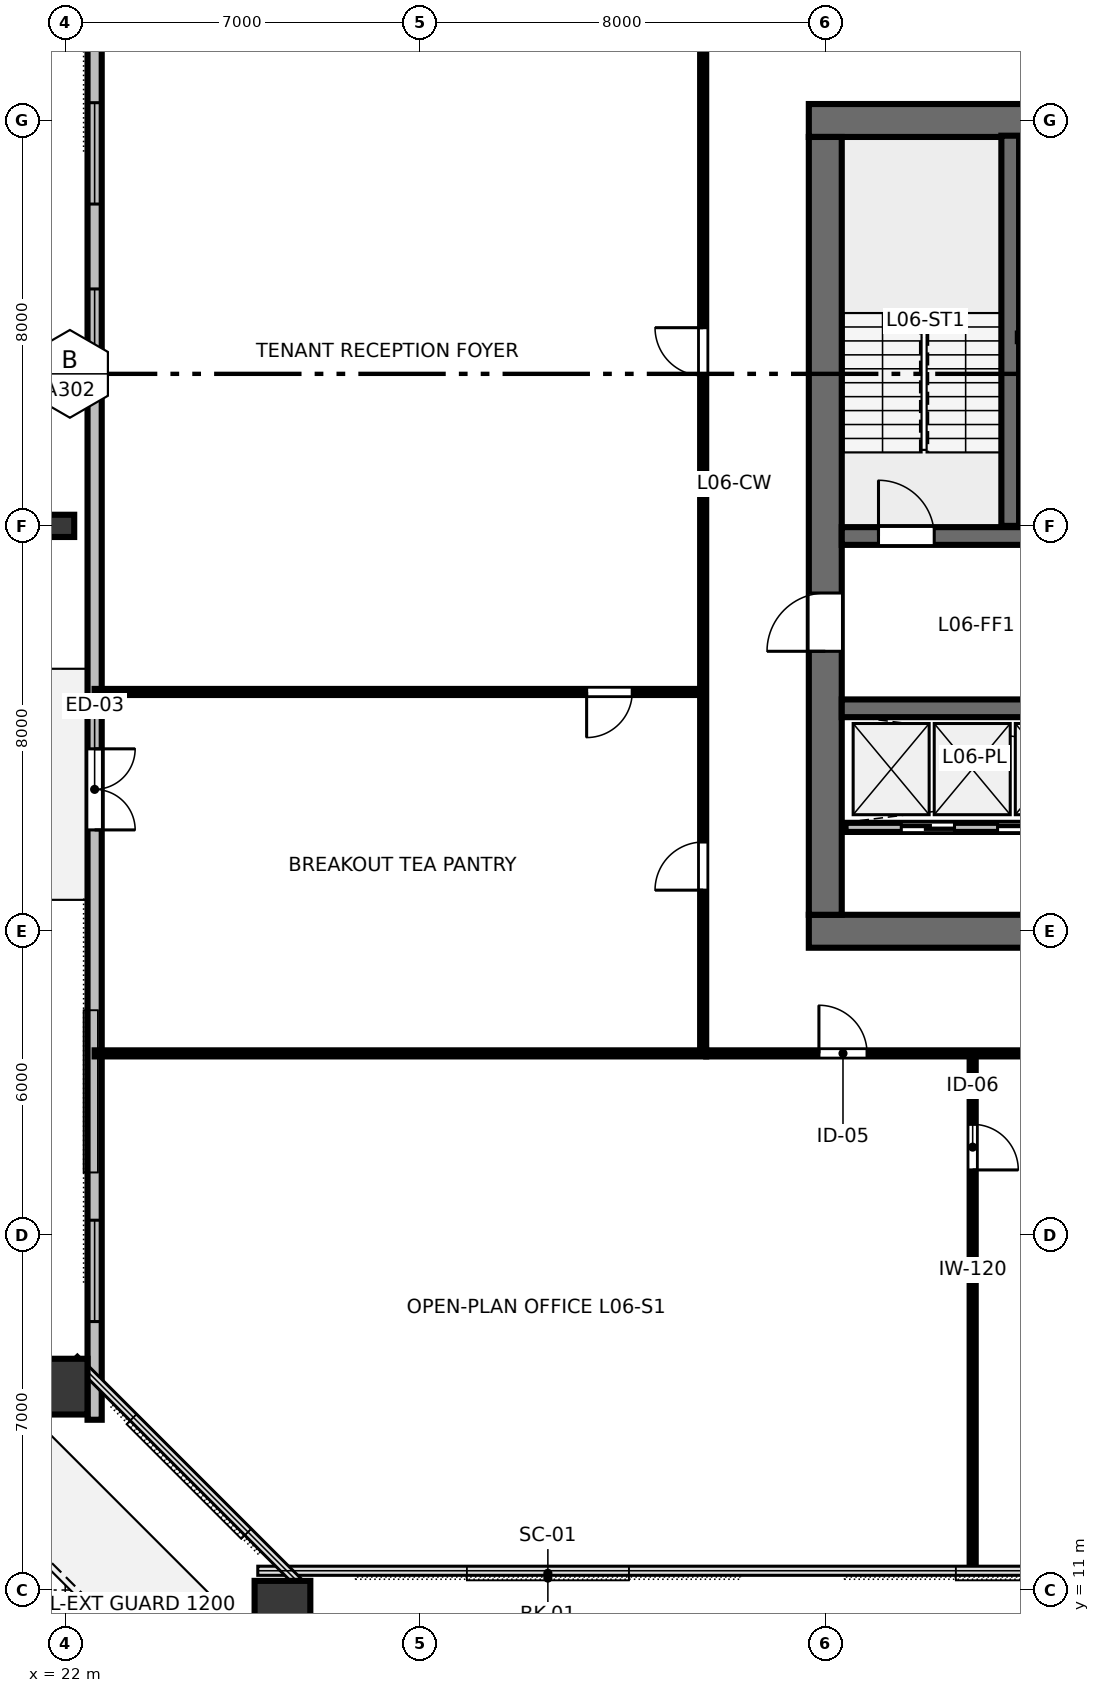
"""IFC4 building model, lengths in metres.
Left out: names, types, materials, properties, quantities, classifications, styles, units other than length and angle.
Written with IfcOpenShell. Run it as: python <this file> out.ifc"""

import sys

from ifc_helpers import new_model, si_unit, direction, frame, frame_2d, origin, origin_2d, place, context, subcontext, project, spatial, rectangle, hollow_rectangle, i_section, extrude, element, fill, save


model = new_model("IFC4")
c1 = context("Model", 3, precision=1e-05, world=origin(), true_north=direction((0.0, 1.0)))
c2 = subcontext(c1, "Body", "Model", "MODEL_VIEW")
j1 = project(units=[si_unit("LENGTHUNIT", "METRE"), si_unit("PLANEANGLEUNIT", "RADIAN")], contexts=[c1])
p1 = place(None, origin())
s1 = spatial("IfcSite", under=j1, at=p1, CompositionType="ELEMENT")
p2 = place(p1, origin())
s2 = spatial("IfcBuilding", under=s1, at=p2, CompositionType="ELEMENT")
p3 = place(p2, frame((0.0, 0.0, 28.0)))
s3 = spatial("IfcBuildingStorey", under=s2, at=p3, CompositionType="ELEMENT", Elevation=28.0)
p4 = place(p3, frame((36.675, 24.0, 0.0), z_axis=(0.0, 0.0, 1.0), x_axis=(1.0, 0.0, 0.0)))
e1 = element("IfcWall", 1, at=p4, inside=s3, PredefinedType="SHEAR", context=c2, shape_type="SweptSolid", body=[
    extrude(rectangle(XDim=18.65, YDim=0.65, at=frame_2d((9.325, 0.0))), origin(), (0.0, 0.0, 1.0), 3.36),
])
p5 = place(p4, frame((5.725, 0.0, 0.0)))
e2 = element("IfcOpeningElement", 2, at=p5, cuts=e1, PredefinedType="OPENING", context=c2, shape_type="SweptSolid", body=[
    extrude(rectangle(XDim=1.6, YDim=2.15, at=frame_2d((0.8, 1.075))), frame((0.0, 0.335, 0.0), z_axis=(0.0, -1.0, 0.0), x_axis=(1.0, 0.0, 0.0)), (0.0, 0.0, 1.0), 0.67),
])
p6 = place(p4, frame((12.125, 0.0, 0.0)))
e3 = element("IfcOpeningElement", 3, at=p6, cuts=e1, PredefinedType="OPENING", context=c2, shape_type="SweptSolid", body=[
    extrude(rectangle(XDim=1.6, YDim=2.15, at=frame_2d((0.8, 1.075))), frame((0.0, 0.335, 0.0), z_axis=(0.0, -1.0, 0.0), x_axis=(1.0, 0.0, 0.0)), (0.0, 0.0, 1.0), 0.67),
])
p7 = place(p3, frame((36.675, 40.0, 0.0), z_axis=(0.0, 0.0, 1.0), x_axis=(1.0, 0.0, 0.0)))
e4 = element("IfcWall", 4, at=p7, inside=s3, PredefinedType="SHEAR", context=c2, shape_type="SweptSolid", body=[
    extrude(rectangle(XDim=18.65, YDim=0.65, at=frame_2d((9.325, 0.0))), origin(), (0.0, 0.0, 1.0), 3.36),
])
p8 = place(p7, frame((8.825, 0.0, 0.0)))
e5 = element("IfcOpeningElement", 5, at=p8, cuts=e4, PredefinedType="OPENING", context=c2, shape_type="SweptSolid", body=[
    extrude(rectangle(XDim=1.0, YDim=2.15, at=frame_2d((0.5, 1.075))), frame((0.0, 0.335, 0.0), z_axis=(0.0, -1.0, 0.0), x_axis=(1.0, 0.0, 0.0)), (0.0, 0.0, 1.0), 0.67),
])
p9 = place(p3, frame((37.0, 24.325, 0.0), z_axis=(0.0, 0.0, 1.0), x_axis=(0.0, 1.0, 0.0)))
e6 = element("IfcWall", 6, at=p9, inside=s3, PredefinedType="SHEAR", context=c2, shape_type="SweptSolid", body=[
    extrude(rectangle(XDim=15.35, YDim=0.65, at=frame_2d((7.675, 0.0))), origin(), (0.0, 0.0, 1.0), 3.36),
])
p10 = place(p9, frame((5.2, 0.0, 0.0)))
e7 = element("IfcOpeningElement", 7, at=p10, cuts=e6, PredefinedType="OPENING", context=c2, shape_type="SweptSolid", body=[
    extrude(rectangle(XDim=1.15, YDim=2.15, at=frame_2d((0.575, 1.075))), frame((0.0, 0.335, 0.0), z_axis=(0.0, -1.0, 0.0), x_axis=(1.0, 0.0, 0.0)), (0.0, 0.0, 1.0), 0.67),
])
p11 = place(p3, frame((37.325, 31.8, 0.0), z_axis=(0.0, 0.0, 1.0), x_axis=(1.0, 0.0, 0.0)))
e8 = element("IfcWall", 8, at=p11, inside=s3, PredefinedType="SHEAR", context=c2, shape_type="SweptSolid", body=[
    extrude(rectangle(XDim=17.35, YDim=0.35, at=frame_2d((8.675, 0.0))), origin(), (0.0, 0.0, 1.0), 3.36),
])
p12 = place(p11, frame((0.725, 0.0, 0.0)))
e9 = element("IfcOpeningElement", 9, at=p12, cuts=e8, PredefinedType="OPENING", context=c2, shape_type="SweptSolid", body=[
    extrude(rectangle(XDim=1.1, YDim=2.15, at=frame_2d((0.55, 1.075))), frame((0.0, 0.185, 0.0), z_axis=(0.0, -1.0, 0.0), x_axis=(1.0, 0.0, 0.0)), (0.0, 0.0, 1.0), 0.37),
])
p13 = place(p11, frame((14.625, 0.0, 0.0)))
e10 = element("IfcOpeningElement", 10, at=p13, cuts=e8, PredefinedType="OPENING", context=c2, shape_type="SweptSolid", body=[
    extrude(rectangle(XDim=1.1, YDim=2.15, at=frame_2d((0.55, 1.075))), frame((0.0, 0.185, 0.0), z_axis=(0.0, -1.0, 0.0), x_axis=(1.0, 0.0, 0.0)), (0.0, 0.0, 1.0), 0.37),
])
p14 = place(p3, frame((37.325, 28.4, 0.0), z_axis=(0.0, 0.0, 1.0), x_axis=(1.0, 0.0, 0.0)))
e11 = element("IfcWall", 11, at=p14, inside=s3, PredefinedType="SHEAR", context=c2, shape_type="SweptSolid", body=[
    extrude(rectangle(XDim=17.35, YDim=0.35, at=frame_2d((8.675, 0.0))), origin(), (0.0, 0.0, 1.0), 3.36),
])
p15 = place(p3, frame((26.287, 10.531, 0.0), z_axis=(0.0, 0.0, 1.0), x_axis=(1.0, 0.0, 0.0)))
e12 = element("IfcColumn", 12, at=p15, inside=s3, PredefinedType="COLUMN", context=c2, shape_type="SweptSolid", body=[
    extrude(hollow_rectangle(XDim=1.1, YDim=1.3, WallThickness=0.07, at=origin_2d()), origin(), (0.0, 0.0, 1.0), 3.358),
])
p16 = place(p3, frame((21.92, 32.0, 0.0), z_axis=(0.0, 0.0, 1.0), x_axis=(0.0, 1.0, 0.0)))
e13 = element("IfcColumn", 13, at=p16, inside=s3, PredefinedType="COLUMN", context=c2, shape_type="SweptSolid", body=[
    extrude(i_section(OverallWidth=0.439, OverallDepth=0.514, WebThickness=0.06, FlangeThickness=0.097, FilletRadius=0.025, at=origin_2d()), origin(), (0.0, 0.0, 1.0), 3.358),
])
p17 = place(p3, frame((21.789, 15.013, 0.0), z_axis=(0.0, 0.0, 1.0), x_axis=(0.0, 1.0, 0.0)))
e14 = element("IfcColumn", 14, at=p17, inside=s3, PredefinedType="COLUMN", context=c2, shape_type="SweptSolid", body=[
    extrude(hollow_rectangle(XDim=1.1, YDim=1.3, WallThickness=0.07, at=origin_2d()), origin(), (0.0, 0.0, 1.0), 3.358),
])
p18 = place(p3, frame((22.58, 49.64, 0.0), z_axis=(0.0, 0.0, 1.0), x_axis=(0.0, -1.0, 0.0)))
e15 = element("IfcWall", 15, at=p18, inside=s3, PredefinedType="STANDARD", context=c2, shape_type="SweptSolid", body=[
    extrude(rectangle(XDim=35.28, YDim=0.28, at=frame_2d((17.64, 0.0))), origin(), (0.0, 0.0, 1.0), 3.36),
])
p19 = place(p18, frame((22.04, 0.0, 0.0)))
e16 = element("IfcOpeningElement", 16, at=p19, cuts=e15, PredefinedType="OPENING", context=c2, shape_type="SweptSolid", body=[
    extrude(rectangle(XDim=1.6, YDim=2.15, at=frame_2d((0.8, 1.075))), frame((0.0, 0.15, 0.0), z_axis=(0.0, -1.0, 0.0), x_axis=(1.0, 0.0, 0.0)), (0.0, 0.0, 1.0), 0.3),
])
p20 = place(p18, frame((1.938, 0.0, 0.8)))
e17 = element("IfcOpeningElement", 17, at=p20, cuts=e15, PredefinedType="OPENING", context=c2, shape_type="SweptSolid", body=[
    extrude(rectangle(XDim=2.0, YDim=1.95, at=frame_2d((1.0, 0.975))), frame((0.0, 0.15, 0.0), z_axis=(0.0, -1.0, 0.0), x_axis=(1.0, 0.0, 0.0)), (0.0, 0.0, 1.0), 0.3),
])
p21 = place(p18, frame((9.289, 0.0, 0.8)))
e18 = element("IfcOpeningElement", 18, at=p21, cuts=e15, PredefinedType="OPENING", context=c2, shape_type="SweptSolid", body=[
    extrude(rectangle(XDim=2.0, YDim=1.95, at=frame_2d((1.0, 0.975))), frame((0.0, 0.15, 0.0), z_axis=(0.0, -1.0, 0.0), x_axis=(1.0, 0.0, 0.0)), (0.0, 0.0, 1.0), 0.3),
])
p22 = place(p18, frame((12.964, 0.0, 0.8)))
e19 = element("IfcOpeningElement", 19, at=p22, cuts=e15, PredefinedType="OPENING", context=c2, shape_type="SweptSolid", body=[
    extrude(rectangle(XDim=2.0, YDim=1.95, at=frame_2d((1.0, 0.975))), frame((0.0, 0.15, 0.0), z_axis=(0.0, -1.0, 0.0), x_axis=(1.0, 0.0, 0.0)), (0.0, 0.0, 1.0), 0.3),
])
p23 = place(p18, frame((31.342, 0.0, 0.8)))
e20 = element("IfcOpeningElement", 20, at=p23, cuts=e15, PredefinedType="OPENING", context=c2, shape_type="SweptSolid", body=[
    extrude(rectangle(XDim=2.0, YDim=1.95, at=frame_2d((1.0, 0.975))), frame((0.0, 0.15, 0.0), z_axis=(0.0, -1.0, 0.0), x_axis=(1.0, 0.0, 0.0)), (0.0, 0.0, 1.0), 0.3),
])
p24 = place(p3, frame((40.65, 32.0, 0.0), z_axis=(0.0, 0.0, 1.0), x_axis=(0.0, 1.0, 0.0)))
e21 = element("IfcWall", 21, at=p24, inside=s3, PredefinedType="SHEAR", context=c2, shape_type="SweptSolid", body=[
    extrude(rectangle(XDim=7.7, YDim=0.35, at=frame_2d((3.85, 0.0))), origin(), (0.0, 0.0, 1.0), 3.6),
])
p25 = place(p3, frame((40.8, 35.72, 0.0), z_axis=(0.0, 0.0, 1.0), x_axis=(1.0, 0.0, 0.0)))
e22 = element("IfcWall", 22, at=p25, inside=s3, PredefinedType="PARTITIONING", context=c2, shape_type="SweptSolid", body=[
    extrude(rectangle(XDim=10.4, YDim=0.15, at=frame_2d((5.2, 0.0))), origin(), (0.0, 0.0, 1.0), 3.36),
])
p26 = place(p25, frame((4.9, 0.0, 0.0)))
e23 = element("IfcOpeningElement", 23, at=p26, cuts=e22, PredefinedType="OPENING", context=c2, shape_type="SweptSolid", body=[
    extrude(rectangle(XDim=0.9, YDim=2.15, at=frame_2d((0.45, 1.075))), frame((0.0, 0.085, 0.0), z_axis=(0.0, -1.0, 0.0), x_axis=(1.0, 0.0, 0.0)), (0.0, 0.0, 1.0), 0.17),
])
p27 = place(p3, frame((37.4, 26.05, 0.0), z_axis=(0.0, 0.0, 1.0), x_axis=(1.0, 0.0, 0.0)))
e24 = element("IfcWall", 24, at=p27, inside=s3, PredefinedType="PARTITIONING", context=c2, shape_type="SweptSolid", body=[
    extrude(rectangle(XDim=17.2, YDim=0.18, at=frame_2d((8.6, 0.0))), origin(), (0.0, 0.0, 1.0), 3.36),
])
p28 = place(p27, frame((1.1, 0.0, 0.0)))
e25 = element("IfcOpeningElement", 25, at=p28, cuts=e24, PredefinedType="OPENING", context=c2, shape_type="SweptSolid", body=[
    extrude(rectangle(XDim=1.05, YDim=2.15, at=frame_2d((0.525, 1.075))), frame((0.0, 0.1, 0.0), z_axis=(0.0, -1.0, 0.0), x_axis=(1.0, 0.0, 0.0)), (0.0, 0.0, 1.0), 0.2),
])
p29 = place(p27, frame((3.0, 0.0, 0.0)))
e26 = element("IfcOpeningElement", 26, at=p29, cuts=e24, PredefinedType="OPENING", context=c2, shape_type="SweptSolid", body=[
    extrude(rectangle(XDim=1.05, YDim=2.15, at=frame_2d((0.525, 1.075))), frame((0.0, 0.1, 0.0), z_axis=(0.0, -1.0, 0.0), x_axis=(1.0, 0.0, 0.0)), (0.0, 0.0, 1.0), 0.2),
])
p30 = place(p3, frame((39.909, 21.59, 0.0), z_axis=(0.0, 0.0, 1.0), x_axis=(0.0, -1.0, 0.0)))
e27 = element("IfcWall", 27, at=p30, inside=s3, PredefinedType="PARTITIONING", context=c2, shape_type="SweptSolid", body=[
    extrude(rectangle(XDim=10.21, YDim=0.12, at=frame_2d((5.105, 0.0))), origin(), (0.0, 0.0, 1.0), 2.64),
])
p31 = place(p30, frame((1.4, 0.0, 0.0)))
e28 = element("IfcOpeningElement", 28, at=p31, cuts=e27, PredefinedType="OPENING", context=c2, shape_type="SweptSolid", body=[
    extrude(rectangle(XDim=0.9, YDim=2.15, at=frame_2d((0.45, 1.075))), frame((0.0, 0.07, 0.0), z_axis=(0.0, -1.0, 0.0), x_axis=(1.0, 0.0, 0.0)), (0.0, 0.0, 1.0), 0.14),
])
p32 = place(p3, frame((34.65, 21.59, 0.0), z_axis=(0.0, 0.0, 1.0), x_axis=(1.0, 0.0, 0.0)))
e29 = element("IfcWall", 29, at=p32, inside=s3, PredefinedType="PARTITIONING", context=c2, shape_type="SweptSolid", body=[
    extrude(rectangle(XDim=22.7, YDim=0.12, at=frame_2d((11.35, 0.0))), origin(), (0.0, 0.0, 1.0), 2.64),
])
p33 = place(p32, frame((2.224, 0.0, 0.0)))
e30 = element("IfcOpeningElement", 30, at=p33, cuts=e29, PredefinedType="OPENING", context=c2, shape_type="SweptSolid", body=[
    extrude(rectangle(XDim=0.95, YDim=2.15, at=frame_2d((0.475, 1.075))), frame((0.0, 0.07, 0.0), z_axis=(0.0, -1.0, 0.0), x_axis=(1.0, 0.0, 0.0)), (0.0, 0.0, 1.0), 0.14),
])
p34 = place(p32, frame((9.381, 0.0, 0.0)))
e31 = element("IfcOpeningElement", 31, at=p34, cuts=e29, PredefinedType="OPENING", context=c2, shape_type="SweptSolid", body=[
    extrude(rectangle(XDim=0.95, YDim=2.15, at=frame_2d((0.475, 1.075))), frame((0.0, 0.07, 0.0), z_axis=(0.0, -1.0, 0.0), x_axis=(1.0, 0.0, 0.0)), (0.0, 0.0, 1.0), 0.14),
])
p35 = place(p32, frame((18.031, 0.0, 0.0)))
e32 = element("IfcOpeningElement", 32, at=p35, cuts=e29, PredefinedType="OPENING", context=c2, shape_type="SweptSolid", body=[
    extrude(rectangle(XDim=0.95, YDim=2.15, at=frame_2d((0.475, 1.075))), frame((0.0, 0.07, 0.0), z_axis=(0.0, -1.0, 0.0), x_axis=(1.0, 0.0, 0.0)), (0.0, 0.0, 1.0), 0.14),
])
p36 = place(p3, frame((34.59, 28.722, 0.0), z_axis=(0.0, 0.0, 1.0), x_axis=(-1.0, 0.0, 0.0)))
e33 = element("IfcWall", 33, at=p36, inside=s3, PredefinedType="PARTITIONING", context=c2, shape_type="SweptSolid", body=[
    extrude(rectangle(XDim=12.01, YDim=0.12, at=frame_2d((6.005, 0.0))), origin(), (0.0, 0.0, 1.0), 2.64),
])
p37 = place(p36, frame((1.4, 0.0, 0.0)))
e34 = element("IfcOpeningElement", 34, at=p37, cuts=e33, PredefinedType="OPENING", context=c2, shape_type="SweptSolid", body=[
    extrude(rectangle(XDim=0.9, YDim=2.15, at=frame_2d((0.45, 1.075))), frame((0.0, 0.07, 0.0), z_axis=(0.0, -1.0, 0.0), x_axis=(1.0, 0.0, 0.0)), (0.0, 0.0, 1.0), 0.14),
])
p38 = place(p3, frame((34.59, 21.65, 0.0), z_axis=(0.0, 0.0, 1.0), x_axis=(0.0, 1.0, 0.0)))
e35 = element("IfcWall", 35, at=p38, inside=s3, PredefinedType="PARTITIONING", context=c2, shape_type="SweptSolid", body=[
    extrude(rectangle(XDim=20.7, YDim=0.12, at=frame_2d((10.35, 0.0))), origin(), (0.0, 0.0, 1.0), 2.64),
])
p39 = place(p38, frame((3.161, 0.0, 0.0)))
e36 = element("IfcOpeningElement", 36, at=p39, cuts=e35, PredefinedType="OPENING", context=c2, shape_type="SweptSolid", body=[
    extrude(rectangle(XDim=0.95, YDim=2.15, at=frame_2d((0.475, 1.075))), frame((0.0, 0.07, 0.0), z_axis=(0.0, -1.0, 0.0), x_axis=(1.0, 0.0, 0.0)), (0.0, 0.0, 1.0), 0.14),
])
p40 = place(p38, frame((13.311, 0.0, 0.0)))
e37 = element("IfcOpeningElement", 37, at=p40, cuts=e35, PredefinedType="OPENING", context=c2, shape_type="SweptSolid", body=[
    extrude(rectangle(XDim=0.95, YDim=2.15, at=frame_2d((0.475, 1.075))), frame((0.0, 0.07, 0.0), z_axis=(0.0, -1.0, 0.0), x_axis=(1.0, 0.0, 0.0)), (0.0, 0.0, 1.0), 0.14),
])
p41 = place(p3, frame((34.65, 21.59, 0.0), z_axis=(0.0, 0.0, 1.0), x_axis=(-1.0, 0.0, 0.0)))
e38 = element("IfcWall", 38, at=p41, inside=s3, PredefinedType="PARTITIONING", context=c2, shape_type="SweptSolid", body=[
    extrude(rectangle(XDim=12.07, YDim=0.12, at=frame_2d((6.035, 0.0))), origin(), (0.0, 0.0, 1.0), 2.64),
])
p42 = place(p19, origin())
e39 = element("IfcDoor", 39, at=p42, inside=s3, OperationType="DOUBLE_DOOR_SINGLE_SWING", PredefinedType="DOOR", context=c2, shape_type="SweptSolid", body=[
    extrude(rectangle(XDim=1.6, YDim=2.15, at=frame_2d((0.8, 1.075))), frame((0.0, 0.025, 0.0), z_axis=(0.0, -1.0, 0.0), x_axis=(1.0, 0.0, 0.0)), (0.0, 0.0, 1.0), 0.05),
])
fill(e16, e39)
p43 = place(p21, origin())
e40 = element("IfcWindow", 40, at=p43, inside=s3, PartitioningType="SINGLE_PANEL", PredefinedType="WINDOW", context=c2, shape_type="SweptSolid", body=[
    extrude(rectangle(XDim=2.0, YDim=1.95, at=frame_2d((1.0, 0.975))), frame((0.0, 0.03, 0.0), z_axis=(0.0, -1.0, 0.0), x_axis=(1.0, 0.0, 0.0)), (0.0, 0.0, 1.0), 0.06),
])
fill(e18, e40)
p44 = place(p22, origin())
e41 = element("IfcWindow", 41, at=p44, inside=s3, PartitioningType="SINGLE_PANEL", PredefinedType="WINDOW", context=c2, shape_type="SweptSolid", body=[
    extrude(rectangle(XDim=2.0, YDim=1.95, at=frame_2d((1.0, 0.975))), frame((0.0, 0.03, 0.0), z_axis=(0.0, -1.0, 0.0), x_axis=(1.0, 0.0, 0.0)), (0.0, 0.0, 1.0), 0.06),
])
fill(e19, e41)
p45 = place(p23, origin())
e42 = element("IfcWindow", 42, at=p45, inside=s3, PartitioningType="SINGLE_PANEL", PredefinedType="WINDOW", context=c2, shape_type="SweptSolid", body=[
    extrude(rectangle(XDim=2.0, YDim=1.95, at=frame_2d((1.0, 0.975))), frame((0.0, 0.03, 0.0), z_axis=(0.0, -1.0, 0.0), x_axis=(1.0, 0.0, 0.0)), (0.0, 0.0, 1.0), 0.06),
])
fill(e20, e42)
p46 = place(p12, origin())
e43 = element("IfcDoor", 43, at=p46, inside=s3, OperationType="SINGLE_SWING_LEFT", PredefinedType="DOOR", context=c2, shape_type="SweptSolid", body=[
    extrude(rectangle(XDim=1.1, YDim=2.15, at=frame_2d((0.55, 1.075))), frame((0.0, 0.025, 0.0), z_axis=(0.0, -1.0, 0.0), x_axis=(1.0, 0.0, 0.0)), (0.0, 0.0, 1.0), 0.05),
])
fill(e9, e43)
p47 = place(p10, origin())
e44 = element("IfcDoor", 44, at=p47, inside=s3, OperationType="SINGLE_SWING_LEFT", PredefinedType="DOOR", context=c2, shape_type="SweptSolid", body=[
    extrude(rectangle(XDim=1.15, YDim=2.15, at=frame_2d((0.575, 1.075))), frame((0.0, 0.025, 0.0), z_axis=(0.0, -1.0, 0.0), x_axis=(1.0, 0.0, 0.0)), (0.0, 0.0, 1.0), 0.05),
])
fill(e7, e44)
p48 = place(p28, origin())
e45 = element("IfcDoor", 45, at=p48, inside=s3, OperationType="SLIDING_TO_LEFT", PredefinedType="DOOR", context=c2, shape_type="SweptSolid", body=[
    extrude(rectangle(XDim=1.05, YDim=2.15, at=frame_2d((0.525, 1.075))), frame((0.0, 0.025, 0.0), z_axis=(0.0, -1.0, 0.0), x_axis=(1.0, 0.0, 0.0)), (0.0, 0.0, 1.0), 0.05),
])
fill(e25, e45)
p49 = place(p29, origin())
e46 = element("IfcDoor", 46, at=p49, inside=s3, OperationType="SLIDING_TO_RIGHT", PredefinedType="DOOR", context=c2, shape_type="SweptSolid", body=[
    extrude(rectangle(XDim=1.05, YDim=2.15, at=frame_2d((0.525, 1.075))), frame((0.0, 0.025, 0.0), z_axis=(0.0, -1.0, 0.0), x_axis=(1.0, 0.0, 0.0)), (0.0, 0.0, 1.0), 0.05),
])
fill(e26, e46)
p50 = place(p31, origin())
e47 = element("IfcDoor", 47, at=p50, inside=s3, OperationType="SINGLE_SWING_RIGHT", PredefinedType="DOOR", context=c2, shape_type="SweptSolid", body=[
    extrude(rectangle(XDim=0.9, YDim=2.15, at=frame_2d((0.45, 1.075))), frame((0.0, 0.025, 0.0), z_axis=(0.0, -1.0, 0.0), x_axis=(1.0, 0.0, 0.0)), (0.0, 0.0, 1.0), 0.05),
])
fill(e28, e47)
p51 = place(p33, origin())
e48 = element("IfcDoor", 48, at=p51, inside=s3, OperationType="SINGLE_SWING_LEFT", PredefinedType="DOOR", context=c2, shape_type="SweptSolid", body=[
    extrude(rectangle(XDim=0.95, YDim=2.15, at=frame_2d((0.475, 1.075))), frame((0.0, 0.025, 0.0), z_axis=(0.0, -1.0, 0.0), x_axis=(1.0, 0.0, 0.0)), (0.0, 0.0, 1.0), 0.05),
])
fill(e30, e48)
p52 = place(p37, origin())
e49 = element("IfcDoor", 49, at=p52, inside=s3, OperationType="SINGLE_SWING_RIGHT", PredefinedType="DOOR", context=c2, shape_type="SweptSolid", body=[
    extrude(rectangle(XDim=0.9, YDim=2.15, at=frame_2d((0.45, 1.075))), frame((0.0, 0.025, 0.0), z_axis=(0.0, -1.0, 0.0), x_axis=(1.0, 0.0, 0.0)), (0.0, 0.0, 1.0), 0.05),
])
fill(e34, e49)
p53 = place(p39, origin())
e50 = element("IfcDoor", 50, at=p53, inside=s3, OperationType="SINGLE_SWING_LEFT", PredefinedType="DOOR", context=c2, shape_type="SweptSolid", body=[
    extrude(rectangle(XDim=0.95, YDim=2.15, at=frame_2d((0.475, 1.075))), frame((0.0, 0.025, 0.0), z_axis=(0.0, -1.0, 0.0), x_axis=(1.0, 0.0, 0.0)), (0.0, 0.0, 1.0), 0.05),
])
fill(e36, e50)
p54 = place(p40, origin())
e51 = element("IfcDoor", 51, at=p54, inside=s3, OperationType="SINGLE_SWING_RIGHT", PredefinedType="DOOR", context=c2, shape_type="SweptSolid", body=[
    extrude(rectangle(XDim=0.95, YDim=2.15, at=frame_2d((0.475, 1.075))), frame((0.0, 0.025, 0.0), z_axis=(0.0, -1.0, 0.0), x_axis=(1.0, 0.0, 0.0)), (0.0, 0.0, 1.0), 0.05),
])
fill(e37, e51)
save(model, sys.argv[1])
